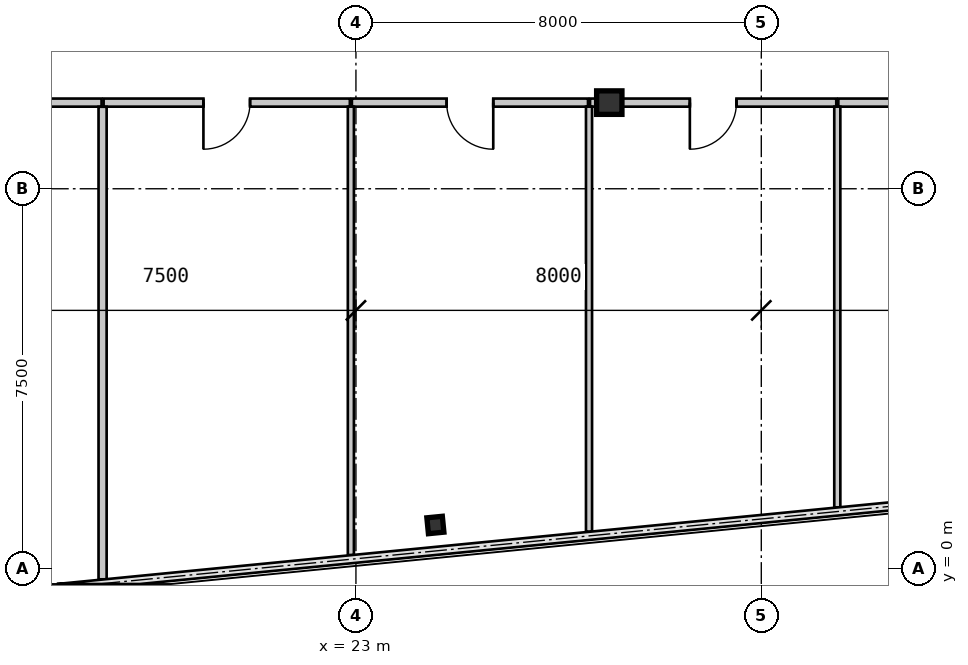
"""IFC4 building model, lengths in metres.
Left out: names, types, materials, properties, quantities, classifications, styles, units other than length and angle.
Written with IfcOpenShell. Run it as: python <this file> out.ifc"""

import sys

from ifc_helpers import new_model, si_unit, direction, frame, frame_2d, origin, origin_2d, place, context, subcontext, project, spatial, rectangle, i_section, extrude, source, transform, mapped, element, fill, save


model = new_model("IFC4")
c1 = context("Model", 3, precision=1e-05, world=origin(), true_north=direction((0.0, 1.0)))
c2 = subcontext(c1, "Body", "Model", "MODEL_VIEW")
j1 = project(units=[si_unit("LENGTHUNIT", "METRE"), si_unit("PLANEANGLEUNIT", "RADIAN")], contexts=[c1])
p1 = place(None, origin())
s1 = spatial("IfcSite", under=j1, at=p1, CompositionType="ELEMENT")
p2 = place(p1, origin())
s2 = spatial("IfcBuilding", under=s1, at=p2, CompositionType="ELEMENT")
p3 = place(p2, frame((0.0, 0.0, 68.25)))
s3 = spatial("IfcBuildingStorey", under=s2, at=p3, CompositionType="ELEMENT", Elevation=68.25)
m1 = source(origin(), c2, "Body", "SweptSolid", [
    extrude(i_section(OverallWidth=0.5, OverallDepth=0.464, WebThickness=0.022, FlangeThickness=0.034, at=origin_2d()), origin(), (0.0, 0.0, 1.0), 3.15),
])
p4 = place(p3, frame((28.0, 9.2, 0.0), z_axis=(0.0, 0.0, 1.0), x_axis=(1.0, 0.0, 0.0)))
e1 = element("IfcColumn", 1, at=p4, inside=s3, PredefinedType="COLUMN", context=c2, shape_type="MappedRepresentation", body=[
    mapped(m1, transform((0.0, 0.0, 0.0), scale=1.0)),
])
m2 = source(origin(), c2, "Body", "SweptSolid", [
    extrude(i_section(OverallWidth=0.307, OverallDepth=0.315, WebThickness=0.012, FlangeThickness=0.019, at=origin_2d()), origin(), (0.0, 0.0, 1.0), 3.15),
])
p5 = place(p3, frame((24.568, 0.865, 0.0), z_axis=(0.0, 0.0, 1.0), x_axis=(0.995227399982, 0.097582899759, 0.0)))
e2 = element("IfcColumn", 2, at=p5, inside=s3, PredefinedType="COLUMN", context=c2, shape_type="MappedRepresentation", body=[
    mapped(m2, transform((0.0, 0.0, 0.0), scale=1.0)),
])
m3 = source(origin(), c2, "Body", "SweptSolid", [
    extrude(rectangle(XDim=1.1, YDim=0.16, at=frame_2d((0.55, 0.0))), origin(), (0.0, 0.0, 1.0), 2.93),
])
p6 = place(p3, frame((17.98, 9.2, 0.0), z_axis=(0.0, 0.0, 1.0), x_axis=(-1.0, 0.0, 0.0)))
e3 = element("IfcWall", 3, at=p6, inside=s3, PredefinedType="PARTITIONING", context=c2, shape_type="MappedRepresentation", body=[
    mapped(m3, transform((0.0, 0.0, 0.0), scale=1.0)),
])
m4 = source(origin(), c2, "Body", "SweptSolid", [
    extrude(rectangle(XDim=4.86, YDim=0.16, at=frame_2d((2.43, 0.0))), origin(), (0.0, 0.0, 1.0), 2.93),
])
p7 = place(p3, frame((22.88, 9.2, 0.0), z_axis=(0.0, 0.0, 1.0), x_axis=(-1.0, 0.0, 0.0)))
e4 = element("IfcWall", 4, at=p7, inside=s3, PredefinedType="PARTITIONING", context=c2, shape_type="MappedRepresentation", body=[
    mapped(m4, transform((0.0, 0.0, 0.0), scale=1.0)),
])
m5 = source(origin(), c2, "Body", "SweptSolid", [
    extrude(rectangle(XDim=0.92, YDim=2.1, at=frame_2d((0.46, 1.05))), frame((0.0, 0.09, 0.0), z_axis=(0.0, -1.0, 0.0), x_axis=(1.0, 0.0, 0.0)), (0.0, 0.0, 1.0), 0.18),
])
p8 = place(p7, frame((1.97, 0.0, 0.0)))
e5 = element("IfcOpeningElement", 5, at=p8, cuts=e4, PredefinedType="OPENING", context=c2, shape_type="MappedRepresentation", body=[
    mapped(m5, transform((0.0, 0.0, 0.0), scale=1.0)),
])
m6 = source(origin(), c2, "Body", "SweptSolid", [
    extrude(rectangle(XDim=4.66, YDim=0.16, at=frame_2d((2.33, 0.0))), origin(), (0.0, 0.0, 1.0), 2.93),
])
p9 = place(p3, frame((27.58, 9.2, 0.0), z_axis=(0.0, 0.0, 1.0), x_axis=(-1.0, 0.0, 0.0)))
e6 = element("IfcWall", 6, at=p9, inside=s3, PredefinedType="PARTITIONING", context=c2, shape_type="MappedRepresentation", body=[
    mapped(m6, transform((0.0, 0.0, 0.0), scale=1.0)),
])
p10 = place(p9, frame((1.87, 0.0, 0.0)))
e7 = element("IfcOpeningElement", 7, at=p10, cuts=e6, PredefinedType="OPENING", context=c2, shape_type="MappedRepresentation", body=[
    mapped(m5, transform((0.0, 0.0, 0.0), scale=1.0)),
])
m7 = source(origin(), c2, "Body", "SweptSolid", [
    extrude(rectangle(XDim=4.48, YDim=0.16, at=frame_2d((2.24, 0.0))), origin(), (0.0, 0.0, 1.0), 2.328),
])
p11 = place(p3, frame((32.48, 9.2, 0.0), z_axis=(0.0, 0.0, 1.0), x_axis=(-1.0, 0.0, 0.0)))
e8 = element("IfcWall", 8, at=p11, inside=s3, PredefinedType="PARTITIONING", context=c2, shape_type="MappedRepresentation", body=[
    mapped(m7, transform((0.0, 0.0, 0.0), scale=1.0)),
])
p12 = place(p11, frame((1.97, 0.0, 0.0)))
e9 = element("IfcOpeningElement", 9, at=p12, cuts=e8, PredefinedType="OPENING", context=c2, shape_type="MappedRepresentation", body=[
    mapped(m5, transform((0.0, 0.0, 0.0), scale=1.0)),
])
m8 = source(origin(), c2, "Body", "SweptSolid", [
    extrude(rectangle(XDim=0.38, YDim=0.16, at=frame_2d((0.19, 0.0))), origin(), (0.0, 0.0, 1.0), 2.93),
])
p13 = place(p3, frame((28.0, 9.2, 0.0), z_axis=(0.0, 0.0, 1.0), x_axis=(-1.0, 0.0, 0.0)))
e10 = element("IfcWall", 10, at=p13, inside=s3, PredefinedType="PARTITIONING", context=c2, shape_type="MappedRepresentation", body=[
    mapped(m8, transform((0.0, 0.0, 0.0), scale=1.0)),
])
m9 = source(origin(), c2, "Body", "SweptSolid", [
    extrude(rectangle(XDim=5.26, YDim=0.16, at=frame_2d((2.63, 0.0))), origin(), (0.0, 0.0, 1.0), 2.328),
])
p14 = place(p3, frame((37.78, 9.2, 0.0), z_axis=(0.0, 0.0, 1.0), x_axis=(-1.0, 0.0, 0.0)))
e11 = element("IfcWall", 11, at=p14, inside=s3, PredefinedType="PARTITIONING", context=c2, shape_type="MappedRepresentation", body=[
    mapped(m9, transform((0.0, 0.0, 0.0), scale=1.0)),
])
p15 = place(p14, frame((2.17, 0.0, 0.0)))
e12 = element("IfcOpeningElement", 12, at=p15, cuts=e11, PredefinedType="OPENING", context=c2, shape_type="MappedRepresentation", body=[
    mapped(m5, transform((0.0, 0.0, 0.0), scale=1.0)),
])
m10 = source(origin(), c2, "Body", "SweptSolid", [
    extrude(rectangle(XDim=9.325, YDim=0.16, at=frame_2d((4.663, 0.0))), origin(), (0.0, 0.0, 1.0), 2.93),
])
p16 = place(p3, frame((18.0, 9.118, 0.0), z_axis=(0.0, 0.0, 1.0), x_axis=(0.0, -1.0, 0.0)))
e13 = element("IfcWall", 13, at=p16, inside=s3, PredefinedType="PARTITIONING", context=c2, shape_type="MappedRepresentation", body=[
    mapped(m10, transform((0.0, 0.0, 0.0), scale=1.0)),
])
m11 = source(origin(), c2, "Body", "SweptSolid", [
    extrude(rectangle(XDim=8.849, YDim=0.12, at=frame_2d((4.424, 0.0))), origin(), (0.0, 0.0, 1.0), 2.93),
])
p17 = place(p3, frame((22.9, 9.12, 0.0), z_axis=(0.0, 0.0, 1.0), x_axis=(0.0, -1.0, 0.0)))
e14 = element("IfcWall", 14, at=p17, inside=s3, PredefinedType="PARTITIONING", context=c2, shape_type="MappedRepresentation", body=[
    mapped(m11, transform((0.0, 0.0, 0.0), scale=1.0)),
])
m12 = source(origin(), c2, "Body", "SweptSolid", [
    extrude(rectangle(XDim=8.388, YDim=0.12, at=frame_2d((4.194, 0.0))), origin(), (0.0, 0.0, 1.0), 2.93),
])
p18 = place(p3, frame((27.6, 9.12, 0.0), z_axis=(0.0, 0.0, 1.0), x_axis=(0.0, -1.0, 0.0)))
e15 = element("IfcWall", 15, at=p18, inside=s3, PredefinedType="PARTITIONING", context=c2, shape_type="MappedRepresentation", body=[
    mapped(m12, transform((0.0, 0.0, 0.0), scale=1.0)),
])
m13 = source(origin(), c2, "Body", "SweptSolid", [
    extrude(rectangle(XDim=7.907, YDim=0.12, at=frame_2d((3.954, 0.0))), origin(), (0.0, 0.0, 1.0), 2.93),
])
p19 = place(p3, frame((32.5, 9.12, 0.0), z_axis=(0.0, 0.0, 1.0), x_axis=(0.0, -1.0, 0.0)))
e16 = element("IfcWall", 16, at=p19, inside=s3, PredefinedType="PARTITIONING", context=c2, shape_type="MappedRepresentation", body=[
    mapped(m13, transform((0.0, 0.0, 0.0), scale=1.0)),
])
m14 = source(origin(), c2, "Body", "SweptSolid", [
    extrude(rectangle(XDim=0.92, YDim=2.1, at=frame_2d((0.46, 1.05))), frame((0.0, 0.025, 0.0), z_axis=(0.0, -1.0, 0.0), x_axis=(1.0, 0.0, 0.0)), (0.0, 0.0, 1.0), 0.05),
])
p20 = place(p8, origin())
e17 = element("IfcDoor", 17, at=p20, inside=s3, OperationType="SINGLE_SWING_RIGHT", PredefinedType="DOOR", context=c2, shape_type="MappedRepresentation", body=[
    mapped(m14, transform((0.0, 0.0, 0.0), scale=1.0)),
])
fill(e5, e17)
p21 = place(p10, origin())
e18 = element("IfcDoor", 18, at=p21, inside=s3, OperationType="SINGLE_SWING_LEFT", PredefinedType="DOOR", context=c2, shape_type="MappedRepresentation", body=[
    mapped(m14, transform((0.0, 0.0, 0.0), scale=1.0)),
])
fill(e7, e18)
p22 = place(p12, origin())
e19 = element("IfcDoor", 19, at=p22, inside=s3, OperationType="SINGLE_SWING_RIGHT", PredefinedType="DOOR", context=c2, shape_type="MappedRepresentation", body=[
    mapped(m14, transform((0.0, 0.0, 0.0), scale=1.0)),
])
fill(e9, e19)
save(model, sys.argv[1])
